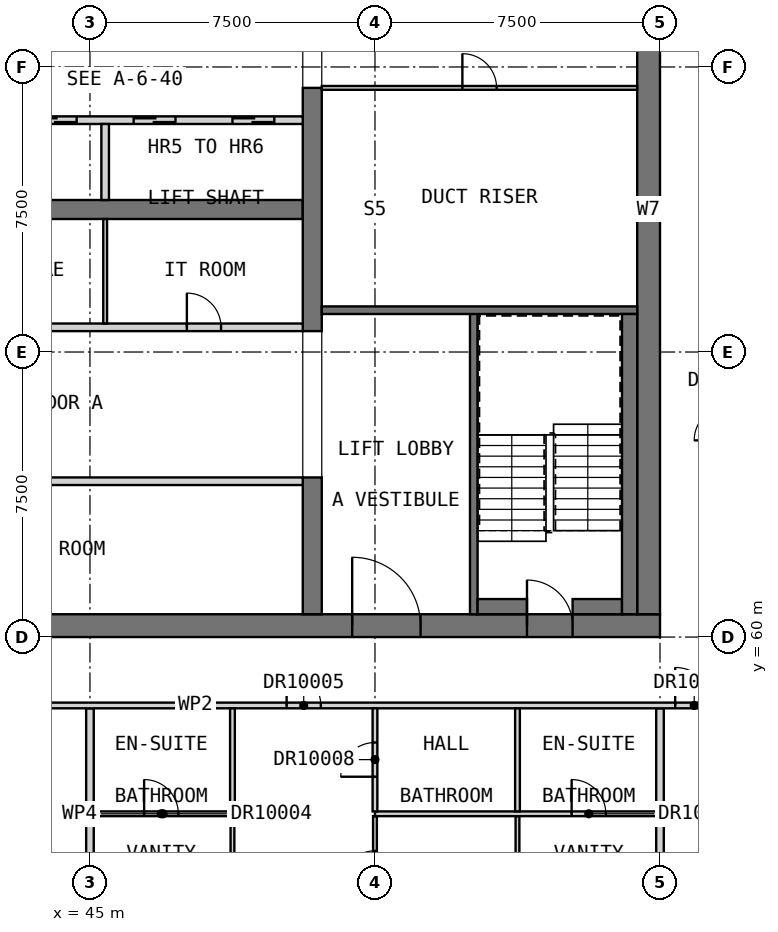
"""IFC4 building model, lengths in metres.
Left out: names, types, materials, properties, quantities, classifications, styles, units other than length and angle.
Written with IfcOpenShell. Run it as: python <this file> out.ifc"""

import sys

from ifc_helpers import new_model, si_unit, direction, frame, frame_2d, origin, place, context, subcontext, project, spatial, rectangle, extrude, element, fill, save


model = new_model("IFC4")
c1 = context("Model", 3, precision=1e-05, world=origin(), true_north=direction((0.0, 1.0)))
c2 = subcontext(c1, "Body", "Model", "MODEL_VIEW")
j1 = project(units=[si_unit("LENGTHUNIT", "METRE"), si_unit("PLANEANGLEUNIT", "RADIAN")], contexts=[c1])
p1 = place(None, origin())
s1 = spatial("IfcSite", under=j1, at=p1, CompositionType="ELEMENT")
p2 = place(p1, origin())
s2 = spatial("IfcBuilding", under=s1, at=p2, CompositionType="ELEMENT")
p3 = place(p2, frame((0.0, 0.0, 273.2)))
s3 = spatial("IfcBuildingStorey", under=s2, at=p3, CompositionType="ELEMENT", Elevation=273.2)
p4 = place(p3, frame((30.0, 60.3, 0.0), z_axis=(0.0, 0.0, 1.0), x_axis=(1.0, 0.0, 0.0)))
e1 = element("IfcWall", 1, at=p4, inside=s3, PredefinedType="SHEAR", context=c2, shape_type="SweptSolid", body=[
    extrude(rectangle(XDim=30.0, YDim=0.6, at=frame_2d((15.0, 0.0))), origin(), (0.0, 0.0, 1.0), 3.5),
])
p5 = place(p4, frame((21.9, 0.0, 0.0)))
e2 = element("IfcOpeningElement", 2, at=p5, cuts=e1, PredefinedType="OPENING", context=c2, shape_type="SweptSolid", body=[
    extrude(rectangle(XDim=1.8, YDim=2.1, at=frame_2d((0.9, 1.05))), frame((0.0, 0.31, 0.0), z_axis=(0.0, -1.0, 0.0), x_axis=(1.0, 0.0, 0.0)), (0.0, 0.0, 1.0), 0.62),
])
p6 = place(p4, frame((26.5, 0.0, 0.0)))
e3 = element("IfcOpeningElement", 3, at=p6, cuts=e1, PredefinedType="OPENING", context=c2, shape_type="SweptSolid", body=[
    extrude(rectangle(XDim=1.2, YDim=2.1, at=frame_2d((0.6, 1.05))), frame((0.0, 0.31, 0.0), z_axis=(0.0, -1.0, 0.0), x_axis=(1.0, 0.0, 0.0)), (0.0, 0.0, 1.0), 0.62),
])
p7 = place(p3, frame((59.7, 60.6, 0.0), z_axis=(0.0, 0.0, 1.0), x_axis=(0.0, 1.0, 0.0)))
e4 = element("IfcWall", 4, at=p7, inside=s3, PredefinedType="SHEAR", context=c2, shape_type="SweptSolid", body=[
    extrude(rectangle(XDim=21.3, YDim=0.6, at=frame_2d((10.65, 0.0))), origin(), (0.0, 0.0, 1.0), 3.5),
])
p8 = place(p7, frame((14.9, 0.0, 0.0)))
e5 = element("IfcOpeningElement", 5, at=p8, cuts=e4, PredefinedType="OPENING", context=c2, shape_type="SweptSolid", body=[
    extrude(rectangle(XDim=1.8, YDim=2.1, at=frame_2d((0.9, 1.05))), frame((0.0, 0.31, 0.0), z_axis=(0.0, -1.0, 0.0), x_axis=(1.0, 0.0, 0.0)), (0.0, 0.0, 1.0), 0.62),
])
p9 = place(p3, frame((35.0, 71.25, 0.0), z_axis=(0.0, 0.0, 1.0), x_axis=(1.0, 0.0, 0.0)))
e6 = element("IfcWall", 6, at=p9, inside=s3, PredefinedType="SHEAR", context=c2, shape_type="SweptSolid", body=[
    extrude(rectangle(XDim=15.6, YDim=0.5, at=frame_2d((7.8, 0.0))), origin(), (0.0, 0.0, 1.0), 3.5),
])
p10 = place(p3, frame((50.85, 60.6, 0.0), z_axis=(0.0, 0.0, 1.0), x_axis=(0.0, 1.0, 0.0)))
e7 = element("IfcWall", 7, at=p10, inside=s3, PredefinedType="SHEAR", context=c2, shape_type="SweptSolid", body=[
    extrude(rectangle(XDim=3.6, YDim=0.5, at=frame_2d((1.8, 0.0))), origin(), (0.0, 0.0, 1.0), 3.5),
])
p11 = place(p3, frame((50.85, 68.05, 0.0), z_axis=(0.0, 0.0, 1.0), x_axis=(0.0, 1.0, 0.0)))
e8 = element("IfcWall", 8, at=p11, inside=s3, PredefinedType="SHEAR", context=c2, shape_type="SweptSolid", body=[
    extrude(rectangle(XDim=6.4, YDim=0.5, at=frame_2d((3.2, 0.0))), origin(), (0.0, 0.0, 1.0), 3.5),
])
p12 = place(p3, frame((35.0, 64.1, 0.0), z_axis=(0.0, 0.0, 1.0), x_axis=(1.0, 0.0, 0.0)))
e9 = element("IfcWall", 9, at=p12, inside=s3, PredefinedType="PARTITIONING", context=c2, shape_type="SweptSolid", body=[
    extrude(rectangle(XDim=15.6, YDim=0.2, at=frame_2d((7.8, 0.0))), origin(), (0.0, 0.0, 1.0), 3.25),
])
p13 = place(p12, frame((7.35, 0.0, 0.0)))
e10 = element("IfcOpeningElement", 10, at=p13, cuts=e9, PredefinedType="OPENING", context=c2, shape_type="SweptSolid", body=[
    extrude(rectangle(XDim=0.9, YDim=2.1, at=frame_2d((0.45, 1.05))), frame((0.0, 0.11, 0.0), z_axis=(0.0, -1.0, 0.0), x_axis=(1.0, 0.0, 0.0)), (0.0, 0.0, 1.0), 0.22),
])
p14 = place(p3, frame((35.0, 68.15, 0.0), z_axis=(0.0, 0.0, 1.0), x_axis=(1.0, 0.0, 0.0)))
e11 = element("IfcWall", 11, at=p14, inside=s3, PredefinedType="PARTITIONING", context=c2, shape_type="SweptSolid", body=[
    extrude(rectangle(XDim=15.6, YDim=0.2, at=frame_2d((7.8, 0.0))), origin(), (0.0, 0.0, 1.0), 3.25),
])
p15 = place(p14, frame((2.15, 0.0, 0.0)))
e12 = element("IfcOpeningElement", 12, at=p15, cuts=e11, PredefinedType="OPENING", context=c2, shape_type="SweptSolid", body=[
    extrude(rectangle(XDim=0.9, YDim=2.1, at=frame_2d((0.45, 1.05))), frame((0.0, 0.11, 0.0), z_axis=(0.0, -1.0, 0.0), x_axis=(1.0, 0.0, 0.0)), (0.0, 0.0, 1.0), 0.22),
])
p16 = place(p14, frame((7.35, 0.0, 0.0)))
e13 = element("IfcOpeningElement", 13, at=p16, cuts=e11, PredefinedType="OPENING", context=c2, shape_type="SweptSolid", body=[
    extrude(rectangle(XDim=0.9, YDim=2.1, at=frame_2d((0.45, 1.05))), frame((0.0, 0.11, 0.0), z_axis=(0.0, -1.0, 0.0), x_axis=(1.0, 0.0, 0.0)), (0.0, 0.0, 1.0), 0.22),
])
p17 = place(p14, frame((12.55, 0.0, 0.0)))
e14 = element("IfcOpeningElement", 14, at=p17, cuts=e11, PredefinedType="OPENING", context=c2, shape_type="SweptSolid", body=[
    extrude(rectangle(XDim=0.9, YDim=2.1, at=frame_2d((0.45, 1.05))), frame((0.0, 0.11, 0.0), z_axis=(0.0, -1.0, 0.0), x_axis=(1.0, 0.0, 0.0)), (0.0, 0.0, 1.0), 0.22),
])
p18 = place(p3, frame((45.4, 68.25, 0.0), z_axis=(0.0, 0.0, 1.0), x_axis=(0.0, 1.0, 0.0)))
e15 = element("IfcWall", 15, at=p18, inside=s3, PredefinedType="PARTITIONING", context=c2, shape_type="SweptSolid", body=[
    extrude(rectangle(XDim=2.75, YDim=0.1, at=frame_2d((1.375, 0.0))), origin(), (0.0, 0.0, 1.0), 3.25),
])
p19 = place(p3, frame((35.0, 73.6, 0.0), z_axis=(0.0, 0.0, 1.0), x_axis=(1.0, 0.0, 0.0)))
e16 = element("IfcWall", 16, at=p19, inside=s3, PredefinedType="SOLIDWALL", context=c2, shape_type="SweptSolid", body=[
    extrude(rectangle(XDim=15.6, YDim=0.2, at=frame_2d((7.8, 0.0))), origin(), (0.0, 0.0, 1.0), 3.5),
])
p20 = place(p19, frame((0.75, 0.0, 0.0)))
e17 = element("IfcOpeningElement", 17, at=p20, cuts=e16, PredefinedType="OPENING", context=c2, shape_type="SweptSolid", body=[
    extrude(rectangle(XDim=1.1, YDim=2.1, at=frame_2d((0.55, 1.05))), frame((0.0, 0.11, 0.0), z_axis=(0.0, -1.0, 0.0), x_axis=(1.0, 0.0, 0.0)), (0.0, 0.0, 1.0), 0.22),
])
p21 = place(p19, frame((3.35, 0.0, 0.0)))
e18 = element("IfcOpeningElement", 18, at=p21, cuts=e16, PredefinedType="OPENING", context=c2, shape_type="SweptSolid", body=[
    extrude(rectangle(XDim=1.1, YDim=2.1, at=frame_2d((0.55, 1.05))), frame((0.0, 0.11, 0.0), z_axis=(0.0, -1.0, 0.0), x_axis=(1.0, 0.0, 0.0)), (0.0, 0.0, 1.0), 0.22),
])
p22 = place(p19, frame((5.95, 0.0, 0.0)))
e19 = element("IfcOpeningElement", 19, at=p22, cuts=e16, PredefinedType="OPENING", context=c2, shape_type="SweptSolid", body=[
    extrude(rectangle(XDim=1.1, YDim=2.1, at=frame_2d((0.55, 1.05))), frame((0.0, 0.11, 0.0), z_axis=(0.0, -1.0, 0.0), x_axis=(1.0, 0.0, 0.0)), (0.0, 0.0, 1.0), 0.22),
])
p23 = place(p19, frame((8.55, 0.0, 0.0)))
e20 = element("IfcOpeningElement", 20, at=p23, cuts=e16, PredefinedType="OPENING", context=c2, shape_type="SweptSolid", body=[
    extrude(rectangle(XDim=1.1, YDim=2.1, at=frame_2d((0.55, 1.05))), frame((0.0, 0.11, 0.0), z_axis=(0.0, -1.0, 0.0), x_axis=(1.0, 0.0, 0.0)), (0.0, 0.0, 1.0), 0.22),
])
p24 = place(p19, frame((11.15, 0.0, 0.0)))
e21 = element("IfcOpeningElement", 21, at=p24, cuts=e16, PredefinedType="OPENING", context=c2, shape_type="SweptSolid", body=[
    extrude(rectangle(XDim=1.1, YDim=2.1, at=frame_2d((0.55, 1.05))), frame((0.0, 0.11, 0.0), z_axis=(0.0, -1.0, 0.0), x_axis=(1.0, 0.0, 0.0)), (0.0, 0.0, 1.0), 0.22),
])
p25 = place(p19, frame((13.75, 0.0, 0.0)))
e22 = element("IfcOpeningElement", 22, at=p25, cuts=e16, PredefinedType="OPENING", context=c2, shape_type="SweptSolid", body=[
    extrude(rectangle(XDim=1.1, YDim=2.1, at=frame_2d((0.55, 1.05))), frame((0.0, 0.11, 0.0), z_axis=(0.0, -1.0, 0.0), x_axis=(1.0, 0.0, 0.0)), (0.0, 0.0, 1.0), 0.22),
])
p26 = place(p3, frame((45.4, 71.5, 0.0), z_axis=(0.0, 0.0, 1.0), x_axis=(0.0, 1.0, 0.0)))
e23 = element("IfcWall", 23, at=p26, inside=s3, PredefinedType="SOLIDWALL", context=c2, shape_type="SweptSolid", body=[
    extrude(rectangle(XDim=2.0, YDim=0.2, at=frame_2d((1.0, 0.0))), origin(), (0.0, 0.0, 1.0), 3.5),
])
p27 = place(p3, frame((55.1, 60.6, 0.0), z_axis=(0.0, 0.0, 1.0), x_axis=(0.0, 1.0, 0.0)))
e24 = element("IfcWall", 24, at=p27, inside=s3, PredefinedType="SOLIDWALL", context=c2, shape_type="SweptSolid", body=[
    extrude(rectangle(XDim=8.0, YDim=0.2, at=frame_2d((4.0, 0.0))), origin(), (0.0, 0.0, 1.0), 3.25),
])
p28 = place(p3, frame((51.1, 68.6, 0.0), z_axis=(0.0, 0.0, 1.0), x_axis=(1.0, 0.0, 0.0)))
e25 = element("IfcWall", 25, at=p28, inside=s3, PredefinedType="SOLIDWALL", context=c2, shape_type="SweptSolid", body=[
    extrude(rectangle(XDim=8.3, YDim=0.2, at=frame_2d((4.15, 0.0))), origin(), (0.0, 0.0, 1.0), 3.25),
])
for number, where, z_axis, x_axis in (
    (26, (55.2, 60.8, 0.0), (0.0, 0.0, 1.0), (1.0, 0.0, 0.0)),
    (27, (57.7, 60.8, 0.0), (0.0, 0.0, 1.0), (1.0, 0.0, 0.0)),
):
    element("IfcWall", number, at=place(p3, frame(where, z_axis=z_axis, x_axis=x_axis)), inside=s3, PredefinedType="SOLIDWALL", context=c2, shape_type="SweptSolid", body=[
        extrude(rectangle(XDim=1.3, YDim=0.4, at=frame_2d((0.65, 0.0))), origin(), (0.0, 0.0, 1.0), 3.25),
    ])
p29 = place(p3, frame((59.2, 60.6, 0.0), z_axis=(0.0, 0.0, 1.0), x_axis=(0.0, 1.0, 0.0)))
e28 = element("IfcWall", 28, at=p29, inside=s3, PredefinedType="SOLIDWALL", context=c2, shape_type="SweptSolid", body=[
    extrude(rectangle(XDim=7.9, YDim=0.4, at=frame_2d((3.95, 0.0))), origin(), (0.0, 0.0, 1.0), 3.25),
])
p30 = place(p3, frame((51.1, 74.45, 0.0), z_axis=(0.0, 0.0, 1.0), x_axis=(1.0, 0.0, 0.0)))
e29 = element("IfcWall", 29, at=p30, inside=s3, PredefinedType="PARTITIONING", context=c2, shape_type="SweptSolid", body=[
    extrude(rectangle(XDim=8.3, YDim=0.1, at=frame_2d((4.15, 0.0))), origin(), (0.0, 0.0, 1.0), 3.25),
])
p31 = place(p30, frame((3.7, 0.0, 0.0)))
e30 = element("IfcOpeningElement", 30, at=p31, cuts=e29, PredefinedType="OPENING", context=c2, shape_type="SweptSolid", body=[
    extrude(rectangle(XDim=0.9, YDim=2.1, at=frame_2d((0.45, 1.05))), frame((0.0, 0.06, 0.0), z_axis=(0.0, -1.0, 0.0), x_axis=(1.0, 0.0, 0.0)), (0.0, 0.0, 1.0), 0.12),
])
for number, where, z_axis, x_axis in (
    (31, (45.0, 45.0, 0.0), (0.0, 0.0, 1.0), (0.0, 1.0, 0.0)),
    (32, (60.0, 45.0, 0.0), (0.0, 0.0, 1.0), (0.0, 1.0, 0.0)),
):
    element("IfcWall", number, at=place(p3, frame(where, z_axis=z_axis, x_axis=x_axis)), inside=s3, PredefinedType="PARTITIONING", context=c2, shape_type="SweptSolid", body=[
        extrude(rectangle(XDim=13.125, YDim=0.2, at=frame_2d((6.562, 0.0))), origin(), (0.0, 0.0, 1.0), 3.25),
    ])
p32 = place(p3, frame((33.75, 58.2, 0.0), z_axis=(0.0, 0.0, 1.0), x_axis=(1.0, 0.0, 0.0)))
e33 = element("IfcWall", 33, at=p32, inside=s3, PredefinedType="PARTITIONING", context=c2, shape_type="SweptSolid", body=[
    extrude(rectangle(XDim=28.05, YDim=0.15, at=frame_2d((14.025, 0.0))), origin(), (0.0, 0.0, 1.0), 3.25),
])
p33 = place(p32, frame((5.125, 0.0, 0.0)))
e34 = element("IfcOpeningElement", 34, at=p33, cuts=e33, PredefinedType="OPENING", context=c2, shape_type="SweptSolid", body=[
    extrude(rectangle(XDim=1.0, YDim=2.1, at=frame_2d((0.5, 1.05))), frame((0.0, 0.085, 0.0), z_axis=(0.0, -1.0, 0.0), x_axis=(1.0, 0.0, 0.0)), (0.0, 0.0, 1.0), 0.17),
])
p34 = place(p32, frame((16.425, 0.0, 0.0)))
e35 = element("IfcOpeningElement", 35, at=p34, cuts=e33, PredefinedType="OPENING", context=c2, shape_type="SweptSolid", body=[
    extrude(rectangle(XDim=0.9, YDim=2.1, at=frame_2d((0.45, 1.05))), frame((0.0, 0.085, 0.0), z_axis=(0.0, -1.0, 0.0), x_axis=(1.0, 0.0, 0.0)), (0.0, 0.0, 1.0), 0.17),
])
p35 = place(p32, frame((26.65, 0.0, 0.0)))
e36 = element("IfcOpeningElement", 36, at=p35, cuts=e33, PredefinedType="OPENING", context=c2, shape_type="SweptSolid", body=[
    extrude(rectangle(XDim=1.0, YDim=2.1, at=frame_2d((0.5, 1.05))), frame((0.0, 0.085, 0.0), z_axis=(0.0, -1.0, 0.0), x_axis=(1.0, 0.0, 0.0)), (0.0, 0.0, 1.0), 0.17),
])
p36 = place(p3, frame((48.75, 45.81, 0.0), z_axis=(0.0, 0.0, 1.0), x_axis=(0.0, 1.0, 0.0)))
e37 = element("IfcWall", 37, at=p36, inside=s3, PredefinedType="PARTITIONING", context=c2, shape_type="SweptSolid", body=[
    extrude(rectangle(XDim=9.478, YDim=0.1, at=frame_2d((4.739, 0.0))), origin(), (0.0, 0.0, 1.0), 3.25),
])
p37 = place(p36, frame((2.49, 0.0, 0.0)))
e38 = element("IfcOpeningElement", 38, at=p37, cuts=e37, PredefinedType="OPENING", context=c2, shape_type="SweptSolid", body=[
    extrude(rectangle(XDim=0.9, YDim=2.1, at=frame_2d((0.45, 1.05))), frame((0.0, 0.06, 0.0), z_axis=(0.0, -1.0, 0.0), x_axis=(1.0, 0.0, 0.0)), (0.0, 0.0, 1.0), 0.12),
])
p38 = place(p3, frame((52.5, 45.0, 0.0), z_axis=(0.0, 0.0, 1.0), x_axis=(0.0, 1.0, 0.0)))
e39 = element("IfcWall", 39, at=p38, inside=s3, PredefinedType="PARTITIONING", context=c2, shape_type="SweptSolid", body=[
    extrude(rectangle(XDim=10.288, YDim=0.1, at=frame_2d((5.144, 0.0))), origin(), (0.0, 0.0, 1.0), 3.25),
])
p39 = place(p38, frame((8.475, 0.0, 0.0)))
e40 = element("IfcOpeningElement", 40, at=p39, cuts=e39, PredefinedType="OPENING", context=c2, shape_type="SweptSolid", body=[
    extrude(rectangle(XDim=0.9, YDim=2.1, at=frame_2d((0.45, 1.05))), frame((0.0, 0.06, 0.0), z_axis=(0.0, -1.0, 0.0), x_axis=(1.0, 0.0, 0.0)), (0.0, 0.0, 1.0), 0.12),
])
p40 = place(p38, frame((3.3, 0.0, 0.0)))
e41 = element("IfcOpeningElement", 41, at=p40, cuts=e39, PredefinedType="OPENING", context=c2, shape_type="SweptSolid", body=[
    extrude(rectangle(XDim=0.9, YDim=2.1, at=frame_2d((0.45, 1.05))), frame((0.0, 0.06, 0.0), z_axis=(0.0, -1.0, 0.0), x_axis=(1.0, 0.0, 0.0)), (0.0, 0.0, 1.0), 0.12),
])
p41 = place(p3, frame((56.25, 45.81, 0.0), z_axis=(0.0, 0.0, 1.0), x_axis=(0.0, 1.0, 0.0)))
e42 = element("IfcWall", 42, at=p41, inside=s3, PredefinedType="PARTITIONING", context=c2, shape_type="SweptSolid", body=[
    extrude(rectangle(XDim=9.478, YDim=0.1, at=frame_2d((4.739, 0.0))), origin(), (0.0, 0.0, 1.0), 3.25),
])
p42 = place(p41, frame((2.49, 0.0, 0.0)))
e43 = element("IfcOpeningElement", 43, at=p42, cuts=e42, PredefinedType="OPENING", context=c2, shape_type="SweptSolid", body=[
    extrude(rectangle(XDim=0.9, YDim=2.1, at=frame_2d((0.45, 1.05))), frame((0.0, 0.06, 0.0), z_axis=(0.0, -1.0, 0.0), x_axis=(1.0, 0.0, 0.0)), (0.0, 0.0, 1.0), 0.12),
])
p43 = place(p3, frame((45.1, 55.35, 0.0), z_axis=(0.0, 0.0, 1.0), x_axis=(1.0, 0.0, 0.0)))
e44 = element("IfcWall", 44, at=p43, inside=s3, PredefinedType="PARTITIONING", context=c2, shape_type="SweptSolid", body=[
    extrude(rectangle(XDim=3.65, YDim=0.125, at=frame_2d((1.825, 0.0))), origin(), (0.0, 0.0, 1.0), 3.25),
])
p44 = place(p43, frame((1.325, 0.0, 0.0)))
e45 = element("IfcOpeningElement", 45, at=p44, cuts=e44, PredefinedType="OPENING", context=c2, shape_type="SweptSolid", body=[
    extrude(rectangle(XDim=0.9, YDim=2.1, at=frame_2d((0.45, 1.05))), frame((0.0, 0.073, 0.0), z_axis=(0.0, -1.0, 0.0), x_axis=(1.0, 0.0, 0.0)), (0.0, 0.0, 1.0), 0.145),
])
p45 = place(p3, frame((52.5, 55.35, 0.0), z_axis=(0.0, 0.0, 1.0), x_axis=(1.0, 0.0, 0.0)))
e46 = element("IfcWall", 46, at=p45, inside=s3, PredefinedType="PARTITIONING", context=c2, shape_type="SweptSolid", body=[
    extrude(rectangle(XDim=7.4, YDim=0.125, at=frame_2d((3.7, 0.0))), origin(), (0.0, 0.0, 1.0), 3.25),
])
p46 = place(p45, frame((5.175, 0.0, 0.0)))
e47 = element("IfcOpeningElement", 47, at=p46, cuts=e46, PredefinedType="OPENING", context=c2, shape_type="SweptSolid", body=[
    extrude(rectangle(XDim=0.9, YDim=2.1, at=frame_2d((0.45, 1.05))), frame((0.0, 0.073, 0.0), z_axis=(0.0, -1.0, 0.0), x_axis=(1.0, 0.0, 0.0)), (0.0, 0.0, 1.0), 0.145),
])
p47 = place(p3, frame((48.75, 55.413, 0.0), z_axis=(0.0, 0.0, 1.0), x_axis=(0.0, 1.0, 0.0)))
e48 = element("IfcWall", 48, at=p47, inside=s3, PredefinedType="PARTITIONING", context=c2, shape_type="SweptSolid", body=[
    extrude(rectangle(XDim=2.712, YDim=0.125, at=frame_2d((1.356, 0.0))), origin(), (0.0, 0.0, 1.0), 3.25),
])
p48 = place(p3, frame((52.5, 55.413, 0.0), z_axis=(0.0, 0.0, 1.0), x_axis=(0.0, 1.0, 0.0)))
e49 = element("IfcWall", 49, at=p48, inside=s3, PredefinedType="PARTITIONING", context=c2, shape_type="SweptSolid", body=[
    extrude(rectangle(XDim=2.712, YDim=0.125, at=frame_2d((1.356, 0.0))), origin(), (0.0, 0.0, 1.0), 3.25),
])
p49 = place(p48, frame((0.913, 0.0, 0.0)))
e50 = element("IfcOpeningElement", 50, at=p49, cuts=e49, PredefinedType="OPENING", context=c2, shape_type="SweptSolid", body=[
    extrude(rectangle(XDim=0.9, YDim=2.1, at=frame_2d((0.45, 1.05))), frame((0.0, 0.073, 0.0), z_axis=(0.0, -1.0, 0.0), x_axis=(1.0, 0.0, 0.0)), (0.0, 0.0, 1.0), 0.145),
])
p50 = place(p3, frame((56.25, 55.413, 0.0), z_axis=(0.0, 0.0, 1.0), x_axis=(0.0, 1.0, 0.0)))
e51 = element("IfcWall", 51, at=p50, inside=s3, PredefinedType="PARTITIONING", context=c2, shape_type="SweptSolid", body=[
    extrude(rectangle(XDim=2.712, YDim=0.125, at=frame_2d((1.356, 0.0))), origin(), (0.0, 0.0, 1.0), 3.25),
])
p51 = place(p17, origin())
e52 = element("IfcDoor", 52, at=p51, inside=s3, OperationType="SINGLE_SWING_RIGHT", PredefinedType="DOOR", context=c2, shape_type="SweptSolid", body=[
    extrude(rectangle(XDim=0.9, YDim=2.1, at=frame_2d((0.45, 1.05))), frame((0.0, 0.025, 0.0), z_axis=(0.0, -1.0, 0.0), x_axis=(1.0, 0.0, 0.0)), (0.0, 0.0, 1.0), 0.05),
])
fill(e14, e52)
p52 = place(p23, origin())
e53 = element("IfcDoor", 53, at=p52, inside=s3, OperationType="DOUBLE_DOOR_SLIDING", PredefinedType="DOOR", context=c2, shape_type="SweptSolid", body=[
    extrude(rectangle(XDim=1.1, YDim=2.1, at=frame_2d((0.55, 1.05))), frame((0.0, 0.025, 0.0), z_axis=(0.0, -1.0, 0.0), x_axis=(1.0, 0.0, 0.0)), (0.0, 0.0, 1.0), 0.05),
])
fill(e20, e53)
p53 = place(p24, origin())
e54 = element("IfcDoor", 54, at=p53, inside=s3, OperationType="DOUBLE_DOOR_SLIDING", PredefinedType="DOOR", context=c2, shape_type="SweptSolid", body=[
    extrude(rectangle(XDim=1.1, YDim=2.1, at=frame_2d((0.55, 1.05))), frame((0.0, 0.025, 0.0), z_axis=(0.0, -1.0, 0.0), x_axis=(1.0, 0.0, 0.0)), (0.0, 0.0, 1.0), 0.05),
])
fill(e21, e54)
p54 = place(p25, origin())
e55 = element("IfcDoor", 55, at=p54, inside=s3, OperationType="DOUBLE_DOOR_SLIDING", PredefinedType="DOOR", context=c2, shape_type="SweptSolid", body=[
    extrude(rectangle(XDim=1.1, YDim=2.1, at=frame_2d((0.55, 1.05))), frame((0.0, 0.025, 0.0), z_axis=(0.0, -1.0, 0.0), x_axis=(1.0, 0.0, 0.0)), (0.0, 0.0, 1.0), 0.05),
])
fill(e22, e55)
p55 = place(p5, origin())
e56 = element("IfcDoor", 56, at=p55, inside=s3, OperationType="DOUBLE_DOOR_SINGLE_SWING", PredefinedType="DOOR", context=c2, shape_type="SweptSolid", body=[
    extrude(rectangle(XDim=1.8, YDim=2.1, at=frame_2d((0.9, 1.05))), frame((0.0, 0.025, 0.0), z_axis=(0.0, -1.0, 0.0), x_axis=(1.0, 0.0, 0.0)), (0.0, 0.0, 1.0), 0.05),
])
fill(e2, e56)
p56 = place(p6, origin())
e57 = element("IfcDoor", 57, at=p56, inside=s3, OperationType="SINGLE_SWING_LEFT", PredefinedType="DOOR", context=c2, shape_type="SweptSolid", body=[
    extrude(rectangle(XDim=1.2, YDim=2.1, at=frame_2d((0.6, 1.05))), frame((0.0, 0.025, 0.0), z_axis=(0.0, -1.0, 0.0), x_axis=(1.0, 0.0, 0.0)), (0.0, 0.0, 1.0), 0.05),
])
fill(e3, e57)
p57 = place(p31, origin())
e58 = element("IfcDoor", 58, at=p57, inside=s3, OperationType="SINGLE_SWING_RIGHT", PredefinedType="DOOR", context=c2, shape_type="SweptSolid", body=[
    extrude(rectangle(XDim=0.9, YDim=2.1, at=frame_2d((0.45, 1.05))), frame((0.0, 0.025, 0.0), z_axis=(0.0, -1.0, 0.0), x_axis=(1.0, 0.0, 0.0)), (0.0, 0.0, 1.0), 0.05),
])
fill(e30, e58)
p58 = place(p44, origin())
e59 = element("IfcDoor", 59, at=p58, inside=s3, OperationType="SINGLE_SWING_LEFT", PredefinedType="DOOR", context=c2, shape_type="SweptSolid", body=[
    extrude(rectangle(XDim=0.9, YDim=2.1, at=frame_2d((0.45, 1.05))), frame((0.0, 0.025, 0.0), z_axis=(0.0, -1.0, 0.0), x_axis=(1.0, 0.0, 0.0)), (0.0, 0.0, 1.0), 0.05),
])
fill(e45, e59)
p59 = place(p34, origin())
e60 = element("IfcDoor", 60, at=p59, inside=s3, OperationType="SINGLE_SWING_RIGHT", PredefinedType="DOOR", context=c2, shape_type="SweptSolid", body=[
    extrude(rectangle(XDim=0.9, YDim=2.1, at=frame_2d((0.45, 1.05))), frame((0.0, 0.025, 0.0), z_axis=(0.0, -1.0, 0.0), x_axis=(1.0, 0.0, 0.0)), (0.0, 0.0, 1.0), 0.05),
])
fill(e35, e60)
p60 = place(p39, origin())
e61 = element("IfcDoor", 61, at=p60, inside=s3, OperationType="SINGLE_SWING_RIGHT", PredefinedType="DOOR", context=c2, shape_type="SweptSolid", body=[
    extrude(rectangle(XDim=0.9, YDim=2.1, at=frame_2d((0.45, 1.05))), frame((0.0, 0.025, 0.0), z_axis=(0.0, -1.0, 0.0), x_axis=(1.0, 0.0, 0.0)), (0.0, 0.0, 1.0), 0.05),
])
fill(e40, e61)
p61 = place(p49, origin())
e62 = element("IfcDoor", 62, at=p61, inside=s3, OperationType="SINGLE_SWING_RIGHT", PredefinedType="DOOR", context=c2, shape_type="SweptSolid", body=[
    extrude(rectangle(XDim=0.9, YDim=2.1, at=frame_2d((0.45, 1.05))), frame((0.0, 0.025, 0.0), z_axis=(0.0, -1.0, 0.0), x_axis=(1.0, 0.0, 0.0)), (0.0, 0.0, 1.0), 0.05),
])
fill(e50, e62)
p62 = place(p46, origin())
e63 = element("IfcDoor", 63, at=p62, inside=s3, OperationType="SINGLE_SWING_LEFT", PredefinedType="DOOR", context=c2, shape_type="SweptSolid", body=[
    extrude(rectangle(XDim=0.9, YDim=2.1, at=frame_2d((0.45, 1.05))), frame((0.0, 0.025, 0.0), z_axis=(0.0, -1.0, 0.0), x_axis=(1.0, 0.0, 0.0)), (0.0, 0.0, 1.0), 0.05),
])
fill(e47, e63)
p63 = place(p35, origin())
e64 = element("IfcDoor", 64, at=p63, inside=s3, OperationType="SINGLE_SWING_RIGHT", PredefinedType="DOOR", context=c2, shape_type="SweptSolid", body=[
    extrude(rectangle(XDim=1.0, YDim=2.1, at=frame_2d((0.5, 1.05))), frame((0.0, 0.025, 0.0), z_axis=(0.0, -1.0, 0.0), x_axis=(1.0, 0.0, 0.0)), (0.0, 0.0, 1.0), 0.05),
])
fill(e36, e64)
save(model, sys.argv[1])
